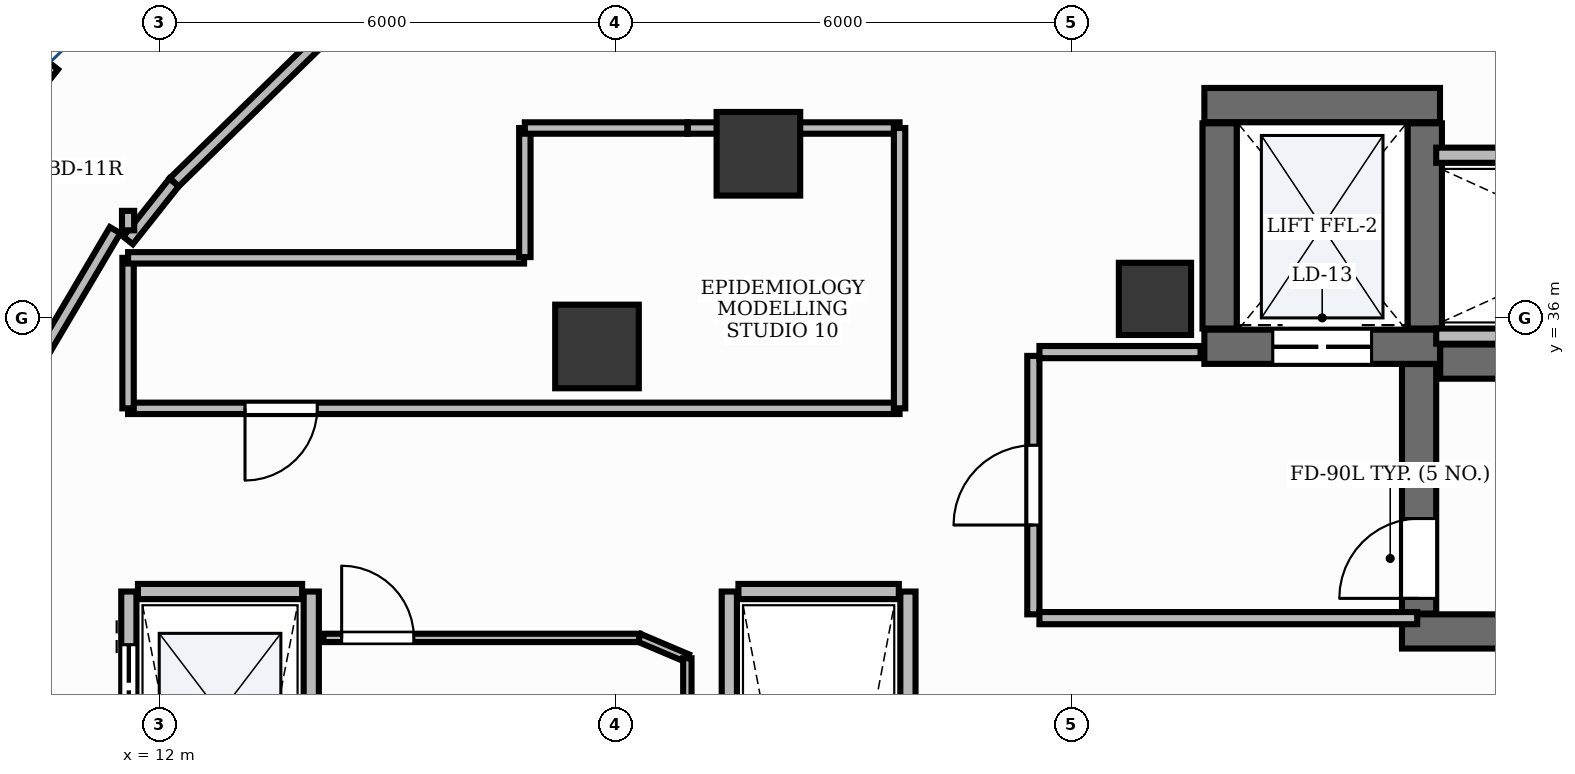
"""IFC4 building model, lengths in metres.
Left out: names, types, materials, properties, quantities, classifications, styles, units other than length and angle.
Written with IfcOpenShell. Run it as: python <this file> out.ifc"""

import sys

from ifc_helpers import new_model, si_unit, direction, frame, frame_2d, origin, origin_2d, place, context, subcontext, project, spatial, rectangle, extrude, element, fill, save


model = new_model("IFC4")
c1 = context("Model", 3, precision=1e-05, world=origin(), true_north=direction((0.0, 1.0)))
c2 = subcontext(c1, "Body", "Model", "MODEL_VIEW")
j1 = project(units=[si_unit("LENGTHUNIT", "METRE"), si_unit("PLANEANGLEUNIT", "RADIAN")], contexts=[c1])
p1 = place(None, origin())
s1 = spatial("IfcSite", under=j1, at=p1, CompositionType="ELEMENT")
p2 = place(p1, origin())
s2 = spatial("IfcBuilding", under=s1, at=p2, CompositionType="ELEMENT")
p3 = place(p2, frame((0.0, 0.0, 98.4)))
s3 = spatial("IfcBuildingStorey", under=s2, at=p3, CompositionType="ELEMENT", Elevation=98.4)
p4 = place(p3, frame((28.852, 35.425, 0.0), z_axis=(0.0, 0.0, 1.0), x_axis=(1.0, 0.0, 0.0)))
e1 = element("IfcWall", 1, at=p4, inside=s3, PredefinedType="SHEAR", context=c2, shape_type="SweptSolid", body=[
    extrude(rectangle(XDim=8.248, YDim=0.45, at=frame_2d((4.124, 0.0))), origin(), (0.0, 0.0, 1.0), 3.9),
])
p5 = place(p3, frame((28.35, 31.875, 0.0), z_axis=(0.0, 0.0, 1.0), x_axis=(1.0, 0.0, 0.0)))
e2 = element("IfcWall", 2, at=p5, inside=s3, PredefinedType="SHEAR", context=c2, shape_type="SweptSolid", body=[
    extrude(rectangle(XDim=8.75, YDim=0.45, at=frame_2d((4.375, 0.0))), origin(), (0.0, 0.0, 1.0), 3.9),
])
p6 = place(p3, frame((28.575, 32.11, 0.0), z_axis=(0.0, 0.0, 1.0), x_axis=(0.0, 1.0, 0.0)))
e3 = element("IfcWall", 3, at=p6, inside=s3, PredefinedType="SHEAR", context=c2, shape_type="SweptSolid", body=[
    extrude(rectangle(XDim=3.283, YDim=0.45, at=frame_2d((1.642, 0.0))), origin(), (0.0, 0.0, 1.0), 3.9),
])
p7 = place(p6, frame((0.2, 0.0, 0.0)))
e4 = element("IfcOpeningElement", 4, at=p7, cuts=e3, PredefinedType="OPENING", context=c2, shape_type="SweptSolid", body=[
    extrude(rectangle(XDim=1.05, YDim=2.15, at=frame_2d((0.525, 1.075))), frame((0.0, 0.24, 0.0), z_axis=(0.0, -1.0, 0.0), x_axis=(1.0, 0.0, 0.0)), (0.0, 0.0, 1.0), 0.48),
])
p8 = place(p3, frame((25.75, 38.8, 0.0), z_axis=(0.0, 0.0, 1.0), x_axis=(1.0, 0.0, 0.0)))
e5 = element("IfcWall", 5, at=p8, inside=s3, PredefinedType="SHEAR", context=c2, shape_type="SweptSolid", body=[
    extrude(rectangle(XDim=3.1, YDim=0.45, at=frame_2d((1.55, 0.0))), origin(), (0.0, 0.0, 1.0), 3.9),
])
p9 = place(p3, frame((25.75, 35.62, 0.0), z_axis=(0.0, 0.0, 1.0), x_axis=(1.0, 0.0, 0.0)))
e6 = element("IfcWall", 6, at=p9, inside=s3, PredefinedType="SHEAR", context=c2, shape_type="SweptSolid", body=[
    extrude(rectangle(XDim=3.1, YDim=0.45, at=frame_2d((1.55, 0.0))), origin(), (0.0, 0.0, 1.0), 3.9),
])
p10 = place(p9, frame((0.9, 0.0, 0.0)))
e7 = element("IfcOpeningElement", 7, at=p10, cuts=e6, PredefinedType="OPENING", context=c2, shape_type="SweptSolid", body=[
    extrude(rectangle(XDim=1.3, YDim=2.2, at=frame_2d((0.65, 1.1))), frame((0.0, 0.24, 0.0), z_axis=(0.0, -1.0, 0.0), x_axis=(1.0, 0.0, 0.0)), (0.0, 0.0, 1.0), 0.48),
])
for number, where, z_axis, x_axis in (
    (8, (25.95, 35.86, 0.0), (0.0, 0.0, 1.0), (0.0, 1.0, 0.0)),
    (9, (28.65, 35.86, 0.0), (0.0, 0.0, 1.0), (0.0, 1.0, 0.0)),
):
    element("IfcWall", number, at=place(p3, frame(where, z_axis=z_axis, x_axis=x_axis)), inside=s3, PredefinedType="SHEAR", context=c2, shape_type="SweptSolid", body=[
        extrude(rectangle(XDim=2.7, YDim=0.45, at=frame_2d((1.35, 0.0))), origin(), (0.0, 0.0, 1.0), 3.9),
    ])
p11 = place(p3, frame((25.1, 36.25, -0.0), z_axis=(0.0, 0.0, 1.0), x_axis=(1.0, 0.0, 0.0)))
e10 = element("IfcColumn", 10, at=p11, inside=s3, PredefinedType="PILASTER", context=c2, shape_type="SweptSolid", body=[
    extrude(rectangle(XDim=0.95, YDim=0.95, at=origin_2d()), origin(), (0.0, 0.0, 1.0), 3.901),
])
for number, where, z_axis, x_axis in (
    (11, (19.883, 38.159, -0.0), (0.0, 0.0, 1.0), (1.0, 0.0, 0.0)),
    (12, (17.759, 35.624, -0.0), (0.0, 0.0, 1.0), (1.0, 0.0, 0.0)),
):
    element("IfcColumn", number, at=place(p3, frame(where, z_axis=z_axis, x_axis=x_axis)), inside=s3, PredefinedType="COLUMN", context=c2, shape_type="SweptSolid", body=[
        extrude(rectangle(XDim=1.1, YDim=1.1, at=origin_2d()), origin(), (0.0, 0.0, 1.0), 3.901),
    ])
p12 = place(p3, frame((10.55, 39.362, 0.0), z_axis=(0.0, 0.0, 1.0), x_axis=(-0.620971431761, -0.783833197139, 0.0)))
e13 = element("IfcWall", 13, at=p12, inside=s3, PredefinedType="STANDARD", context=c2, shape_type="SweptSolid", body=[
    extrude(rectangle(XDim=3.004, YDim=0.3, at=frame_2d((1.502, 0.0))), origin(), (0.0, 0.0, 1.0), 3.9),
])
p13 = place(p12, frame((0.952, 0.0, 0.0)))
e14 = element("IfcOpeningElement", 14, at=p13, cuts=e13, PredefinedType="OPENING", context=c2, shape_type="SweptSolid", body=[
    extrude(rectangle(XDim=1.1, YDim=2.15, at=frame_2d((0.55, 1.075))), frame((0.0, 0.165, 0.0), z_axis=(0.0, -1.0, 0.0), x_axis=(1.0, 0.0, 0.0)), (0.0, 0.0, 1.0), 0.33),
])
p14 = place(p3, frame((11.6, 21.6, 0.0), z_axis=(0.0, 0.0, 1.0), x_axis=(0.0, 1.0, 0.0)))
e15 = element("IfcWall", 15, at=p14, inside=s3, PredefinedType="PARTITIONING", context=c2, shape_type="SweptSolid", body=[
    extrude(rectangle(XDim=10.8, YDim=0.2, at=frame_2d((5.4, 0.0))), origin(), (0.0, 0.0, 1.0), 2.91),
])
p15 = place(p14, frame((0.9, 0.0, 0.0)))
e16 = element("IfcOpeningElement", 16, at=p15, cuts=e15, PredefinedType="OPENING", context=c2, shape_type="SweptSolid", body=[
    extrude(rectangle(XDim=1.1, YDim=2.2, at=frame_2d((0.55, 1.1))), frame((0.0, 0.115, 0.0), z_axis=(0.0, -1.0, 0.0), x_axis=(1.0, 0.0, 0.0)), (0.0, 0.0, 1.0), 0.23),
])
p16 = place(p14, frame((3.6, 0.0, 0.0)))
e17 = element("IfcOpeningElement", 17, at=p16, cuts=e15, PredefinedType="OPENING", context=c2, shape_type="SweptSolid", body=[
    extrude(rectangle(XDim=1.1, YDim=2.2, at=frame_2d((0.55, 1.1))), frame((0.0, 0.115, 0.0), z_axis=(0.0, -1.0, 0.0), x_axis=(1.0, 0.0, 0.0)), (0.0, 0.0, 1.0), 0.23),
])
p17 = place(p14, frame((6.3, 0.0, 0.0)))
e18 = element("IfcOpeningElement", 18, at=p17, cuts=e15, PredefinedType="OPENING", context=c2, shape_type="SweptSolid", body=[
    extrude(rectangle(XDim=1.1, YDim=2.2, at=frame_2d((0.55, 1.1))), frame((0.0, 0.115, 0.0), z_axis=(0.0, -1.0, 0.0), x_axis=(1.0, 0.0, 0.0)), (0.0, 0.0, 1.0), 0.23),
])
p18 = place(p14, frame((9.0, 0.0, 0.0)))
e19 = element("IfcOpeningElement", 19, at=p18, cuts=e15, PredefinedType="OPENING", context=c2, shape_type="SweptSolid", body=[
    extrude(rectangle(XDim=1.1, YDim=2.2, at=frame_2d((0.55, 1.1))), frame((0.0, 0.115, 0.0), z_axis=(0.0, -1.0, 0.0), x_axis=(1.0, 0.0, 0.0)), (0.0, 0.0, 1.0), 0.23),
])
p19 = place(p3, frame((14.0, 21.6, 0.0), z_axis=(0.0, 0.0, 1.0), x_axis=(0.0, 1.0, 0.0)))
e20 = element("IfcWall", 20, at=p19, inside=s3, PredefinedType="PARTITIONING", context=c2, shape_type="SweptSolid", body=[
    extrude(rectangle(XDim=10.8, YDim=0.2, at=frame_2d((5.4, 0.0))), origin(), (0.0, 0.0, 1.0), 2.91),
])
p20 = place(p3, frame((11.72, 32.4, 0.0), z_axis=(0.0, 0.0, 1.0), x_axis=(1.0, 0.0, 0.0)))
e21 = element("IfcWall", 21, at=p20, inside=s3, PredefinedType="PARTITIONING", context=c2, shape_type="SweptSolid", body=[
    extrude(rectangle(XDim=2.16, YDim=0.2, at=frame_2d((1.08, 0.0))), origin(), (0.0, 0.0, 1.0), 2.91),
])
for number, where, z_axis, x_axis in (
    (22, (19.5, 21.6, 0.0), (0.0, 0.0, 1.0), (0.0, 1.0, 0.0)),
    (23, (21.85, 21.6, 0.0), (0.0, 0.0, 1.0), (0.0, 1.0, 0.0)),
):
    element("IfcWall", number, at=place(p3, frame(where, z_axis=z_axis, x_axis=x_axis)), inside=s3, PredefinedType="PARTITIONING", context=c2, shape_type="SweptSolid", body=[
        extrude(rectangle(XDim=10.8, YDim=0.2, at=frame_2d((5.4, 0.0))), origin(), (0.0, 0.0, 1.0), 2.91),
    ])
p21 = place(p3, frame((19.62, 32.4, 0.0), z_axis=(0.0, 0.0, 1.0), x_axis=(1.0, 0.0, 0.0)))
e24 = element("IfcWall", 24, at=p21, inside=s3, PredefinedType="PARTITIONING", context=c2, shape_type="SweptSolid", body=[
    extrude(rectangle(XDim=2.11, YDim=0.2, at=frame_2d((1.055, 0.0))), origin(), (0.0, 0.0, 1.0), 2.91),
])
for number, where, z_axis, x_axis in (
    (25, (28.8, 35.76, 0.0), (0.0, 0.0, 1.0), (1.0, 0.0, 0.0)),
    (26, (28.8, 38.14, 0.0), (0.0, 0.0, 1.0), (1.0, 0.0, 0.0)),
):
    element("IfcWall", number, at=place(p3, frame(where, z_axis=z_axis, x_axis=x_axis)), inside=s3, PredefinedType="PARTITIONING", context=c2, shape_type="SweptSolid", body=[
        extrude(rectangle(XDim=4.57, YDim=0.2, at=frame_2d((2.285, 0.0))), origin(), (0.0, 0.0, 1.0), 2.91),
    ])
p22 = place(p3, frame((23.5, 32.1, 0.0), z_axis=(0.0, 0.0, 1.0), x_axis=(0.0, 1.0, 0.0)))
e27 = element("IfcWall", 27, at=p22, inside=s3, PredefinedType="PARTITIONING", context=c2, shape_type="SweptSolid", body=[
    extrude(rectangle(XDim=3.4, YDim=0.16, at=frame_2d((1.7, 0.0))), origin(), (0.0, 0.0, 1.0), 2.91),
])
p23 = place(p22, frame((1.175, 0.0, 0.0)))
e28 = element("IfcOpeningElement", 28, at=p23, cuts=e27, PredefinedType="OPENING", context=c2, shape_type="SweptSolid", body=[
    extrude(rectangle(XDim=1.05, YDim=2.15, at=frame_2d((0.525, 1.075))), frame((0.0, 0.095, 0.0), z_axis=(0.0, -1.0, 0.0), x_axis=(1.0, 0.0, 0.0)), (0.0, 0.0, 1.0), 0.19),
])
p24 = place(p3, frame((23.58, 32.05, 0.0), z_axis=(0.0, 0.0, 1.0), x_axis=(1.0, 0.0, 0.0)))
e29 = element("IfcWall", 29, at=p24, inside=s3, PredefinedType="PARTITIONING", context=c2, shape_type="SweptSolid", body=[
    extrude(rectangle(XDim=4.97, YDim=0.16, at=frame_2d((2.485, 0.0))), origin(), (0.0, 0.0, 1.0), 2.91),
])
p25 = place(p3, frame((23.58, 35.55, 0.0), z_axis=(0.0, 0.0, 1.0), x_axis=(1.0, 0.0, 0.0)))
e30 = element("IfcWall", 30, at=p25, inside=s3, PredefinedType="PARTITIONING", context=c2, shape_type="SweptSolid", body=[
    extrude(rectangle(XDim=2.12, YDim=0.16, at=frame_2d((1.06, 0.0))), origin(), (0.0, 0.0, 1.0), 2.91),
])
p26 = place(p3, frame((21.74, 34.81, 0.0), z_axis=(0.0, 0.0, 1.0), x_axis=(-1.0, 0.0, 0.0)))
e31 = element("IfcWall", 31, at=p26, inside=s3, PredefinedType="PARTITIONING", context=c2, shape_type="SweptSolid", body=[
    extrude(rectangle(XDim=10.15, YDim=0.15, at=frame_2d((5.075, 0.0))), origin(), (0.0, 0.0, 1.0), 2.91),
])
p27 = place(p26, frame((7.662, 0.0, 0.0)))
e32 = element("IfcOpeningElement", 32, at=p27, cuts=e31, PredefinedType="OPENING", context=c2, shape_type="SweptSolid", body=[
    extrude(rectangle(XDim=0.95, YDim=2.15, at=frame_2d((0.475, 1.075))), frame((0.0, 0.09, 0.0), z_axis=(0.0, -1.0, 0.0), x_axis=(1.0, 0.0, 0.0)), (0.0, 0.0, 1.0), 0.18),
])
p28 = place(p3, frame((14.16, 31.79, 0.0), z_axis=(0.0, 0.0, 1.0), x_axis=(1.0, 0.0, 0.0)))
e33 = element("IfcWall", 33, at=p28, inside=s3, PredefinedType="MOVABLE", context=c2, shape_type="SweptSolid", body=[
    extrude(rectangle(XDim=4.158, YDim=0.11, at=frame_2d((2.079, 0.0))), origin(), (0.0, 0.0, 1.0), 2.91),
])
p29 = place(p28, frame((0.24, 0.0, 0.0)))
e34 = element("IfcOpeningElement", 34, at=p29, cuts=e33, PredefinedType="OPENING", context=c2, shape_type="SweptSolid", body=[
    extrude(rectangle(XDim=0.95, YDim=2.15, at=frame_2d((0.475, 1.075))), frame((0.0, 0.07, 0.0), z_axis=(0.0, -1.0, 0.0), x_axis=(1.0, 0.0, 0.0)), (0.0, 0.0, 1.0), 0.14),
])
p30 = place(p3, frame((14.114, 39.653, 0.0), z_axis=(0.0, 0.0, 1.0), x_axis=(-0.716161838398, -0.697934252794, 0.0)))
e35 = element("IfcWall", 35, at=p30, inside=s3, PredefinedType="PARTITIONING", context=c2, shape_type="SweptSolid", body=[
    extrude(rectangle(XDim=2.679, YDim=0.16, at=frame_2d((1.339, 0.0))), origin(), (0.0, 0.0, 1.0), 2.91),
])
p31 = place(p3, frame((12.195, 37.782, 0.0), z_axis=(0.0, 0.0, 1.0), x_axis=(-0.621081637991, -0.783745876513, 0.0)))
e36 = element("IfcWall", 36, at=p31, inside=s3, PredefinedType="PARTITIONING", context=c2, shape_type="SweptSolid", body=[
    extrude(rectangle(XDim=0.974, YDim=0.16, at=frame_2d((0.487, 0.0))), origin(), (0.0, 0.0, 1.0), 2.91),
])
p32 = place(p3, frame((11.59, 37.152, 0.0), z_axis=(0.0, 0.0, 1.0), x_axis=(0.0, 1.0, 0.0)))
e37 = element("IfcWall", 37, at=p32, inside=s3, PredefinedType="PARTITIONING", context=c2, shape_type="SweptSolid", body=[
    extrude(rectangle(XDim=0.256, YDim=0.16, at=frame_2d((0.128, 0.0))), origin(), (0.0, 0.0, 1.0), 2.91),
])
p33 = place(p3, frame((11.419, 37.154, 0.0), z_axis=(0.0, 0.0, 1.0), x_axis=(-0.508183269016, -0.861248956511, 0.0)))
e38 = element("IfcWall", 38, at=p33, inside=s3, PredefinedType="PARTITIONING", context=c2, shape_type="SweptSolid", body=[
    extrude(rectangle(XDim=4.053, YDim=0.16, at=frame_2d((2.026, 0.0))), origin(), (0.0, 0.0, 1.0), 2.91),
])
p34 = place(p3, frame((18.952, 38.498, 0.0), z_axis=(0.0, 0.0, 1.0), x_axis=(1.0, 0.0, 0.0)))
e39 = element("IfcWall", 39, at=p34, inside=s3, PredefinedType="PARTITIONING", context=c2, shape_type="SweptSolid", body=[
    extrude(rectangle(XDim=2.788, YDim=0.15, at=frame_2d((1.394, 0.0))), origin(), (0.0, 0.0, 1.0), 2.91),
])
p35 = place(p3, frame((21.74, 38.498, 0.0), z_axis=(0.0, 0.0, 1.0), x_axis=(0.0, -1.0, 0.0)))
e40 = element("IfcWall", 40, at=p35, inside=s3, PredefinedType="PARTITIONING", context=c2, shape_type="SweptSolid", body=[
    extrude(rectangle(XDim=3.688, YDim=0.15, at=frame_2d((1.844, 0.0))), origin(), (0.0, 0.0, 1.0), 2.91),
])
p36 = place(p3, frame((11.59, 34.81, 0.0), z_axis=(0.0, 0.0, 1.0), x_axis=(0.0, 1.0, 0.0)))
e41 = element("IfcWall", 41, at=p36, inside=s3, PredefinedType="PARTITIONING", context=c2, shape_type="SweptSolid", body=[
    extrude(rectangle(XDim=1.98, YDim=0.15, at=frame_2d((0.99, 0.0))), origin(), (0.0, 0.0, 1.0), 2.91),
])
p37 = place(p3, frame((11.59, 36.79, 0.0), z_axis=(0.0, 0.0, 1.0), x_axis=(1.0, 0.0, 0.0)))
e42 = element("IfcWall", 42, at=p37, inside=s3, PredefinedType="PARTITIONING", context=c2, shape_type="SweptSolid", body=[
    extrude(rectangle(XDim=5.21, YDim=0.15, at=frame_2d((2.605, 0.0))), origin(), (0.0, 0.0, 1.0), 2.91),
])
p38 = place(p3, frame((16.81, 36.8, 0.0), z_axis=(0.0, 0.0, 1.0), x_axis=(0.0, 1.0, 0.0)))
e43 = element("IfcWall", 43, at=p38, inside=s3, PredefinedType="PARTITIONING", context=c2, shape_type="SweptSolid", body=[
    extrude(rectangle(XDim=1.698, YDim=0.15, at=frame_2d((0.849, 0.0))), origin(), (0.0, 0.0, 1.0), 2.91),
])
p39 = place(p3, frame((16.81, 38.498, 0.0), z_axis=(0.0, 0.0, 1.0), x_axis=(1.0, 0.0, 0.0)))
e44 = element("IfcWall", 44, at=p39, inside=s3, PredefinedType="PARTITIONING", context=c2, shape_type="SweptSolid", body=[
    extrude(rectangle(XDim=2.138, YDim=0.15, at=frame_2d((1.069, 0.0))), origin(), (0.0, 0.0, 1.0), 2.91),
])
p40 = place(p3, frame((18.318, 31.79, 0.0), z_axis=(0.0, 0.0, 1.0), x_axis=(0.920523463189, -0.390687283795, 0.0)))
e45 = element("IfcWall", 45, at=p40, inside=s3, PredefinedType="MOVABLE", context=c2, shape_type="SweptSolid", body=[
    extrude(rectangle(XDim=0.684, YDim=0.11, at=frame_2d((0.342, 0.0))), origin(), (0.0, 0.0, 1.0), 2.91),
])
p41 = place(p3, frame((18.948, 31.522, 0.0), z_axis=(0.0, 0.0, 1.0), x_axis=(0.0, -1.0, 0.0)))
e46 = element("IfcWall", 46, at=p41, inside=s3, PredefinedType="MOVABLE", context=c2, shape_type="SweptSolid", body=[
    extrude(rectangle(XDim=3.475, YDim=0.11, at=frame_2d((1.738, 0.0))), origin(), (0.0, 0.0, 1.0), 2.91),
])
p42 = place(p7, origin())
e47 = element("IfcDoor", 47, at=p42, inside=s3, OperationType="SINGLE_SWING_LEFT", PredefinedType="DOOR", context=c2, shape_type="SweptSolid", body=[
    extrude(rectangle(XDim=1.05, YDim=2.15, at=frame_2d((0.525, 1.075))), frame((0.0, 0.025, 0.0), z_axis=(0.0, -1.0, 0.0), x_axis=(1.0, 0.0, 0.0)), (0.0, 0.0, 1.0), 0.05),
])
fill(e4, e47)
p43 = place(p18, origin())
e48 = element("IfcDoor", 48, at=p43, inside=s3, OperationType="DOUBLE_DOOR_SLIDING", PredefinedType="DOOR", context=c2, shape_type="SweptSolid", body=[
    extrude(rectangle(XDim=1.1, YDim=2.2, at=frame_2d((0.55, 1.1))), frame((0.0, 0.025, 0.0), z_axis=(0.0, -1.0, 0.0), x_axis=(1.0, 0.0, 0.0)), (0.0, 0.0, 1.0), 0.05),
])
fill(e19, e48)
p44 = place(p10, origin())
e49 = element("IfcDoor", 49, at=p44, inside=s3, OperationType="DOUBLE_DOOR_SLIDING", PredefinedType="DOOR", context=c2, shape_type="SweptSolid", body=[
    extrude(rectangle(XDim=1.3, YDim=2.2, at=frame_2d((0.65, 1.1))), frame((0.0, 0.025, 0.0), z_axis=(0.0, -1.0, 0.0), x_axis=(1.0, 0.0, 0.0)), (0.0, 0.0, 1.0), 0.05),
])
fill(e7, e49)
p45 = place(p23, origin())
e50 = element("IfcDoor", 50, at=p45, inside=s3, OperationType="SINGLE_SWING_LEFT", PredefinedType="DOOR", context=c2, shape_type="SweptSolid", body=[
    extrude(rectangle(XDim=1.05, YDim=2.15, at=frame_2d((0.525, 1.075))), frame((0.0, 0.025, 0.0), z_axis=(0.0, -1.0, 0.0), x_axis=(1.0, 0.0, 0.0)), (0.0, 0.0, 1.0), 0.05),
])
fill(e28, e50)
p46 = place(p27, origin())
e51 = element("IfcDoor", 51, at=p46, inside=s3, OperationType="SINGLE_SWING_RIGHT", PredefinedType="DOOR", context=c2, shape_type="SweptSolid", body=[
    extrude(rectangle(XDim=0.95, YDim=2.15, at=frame_2d((0.475, 1.075))), frame((0.0, 0.025, 0.0), z_axis=(0.0, -1.0, 0.0), x_axis=(1.0, 0.0, 0.0)), (0.0, 0.0, 1.0), 0.05),
])
fill(e32, e51)
p47 = place(p29, origin())
e52 = element("IfcDoor", 52, at=p47, inside=s3, OperationType="SINGLE_SWING_LEFT", PredefinedType="DOOR", context=c2, shape_type="SweptSolid", body=[
    extrude(rectangle(XDim=0.95, YDim=2.15, at=frame_2d((0.475, 1.075))), frame((0.0, 0.025, 0.0), z_axis=(0.0, -1.0, 0.0), x_axis=(1.0, 0.0, 0.0)), (0.0, 0.0, 1.0), 0.05),
])
fill(e34, e52)
save(model, sys.argv[1])
